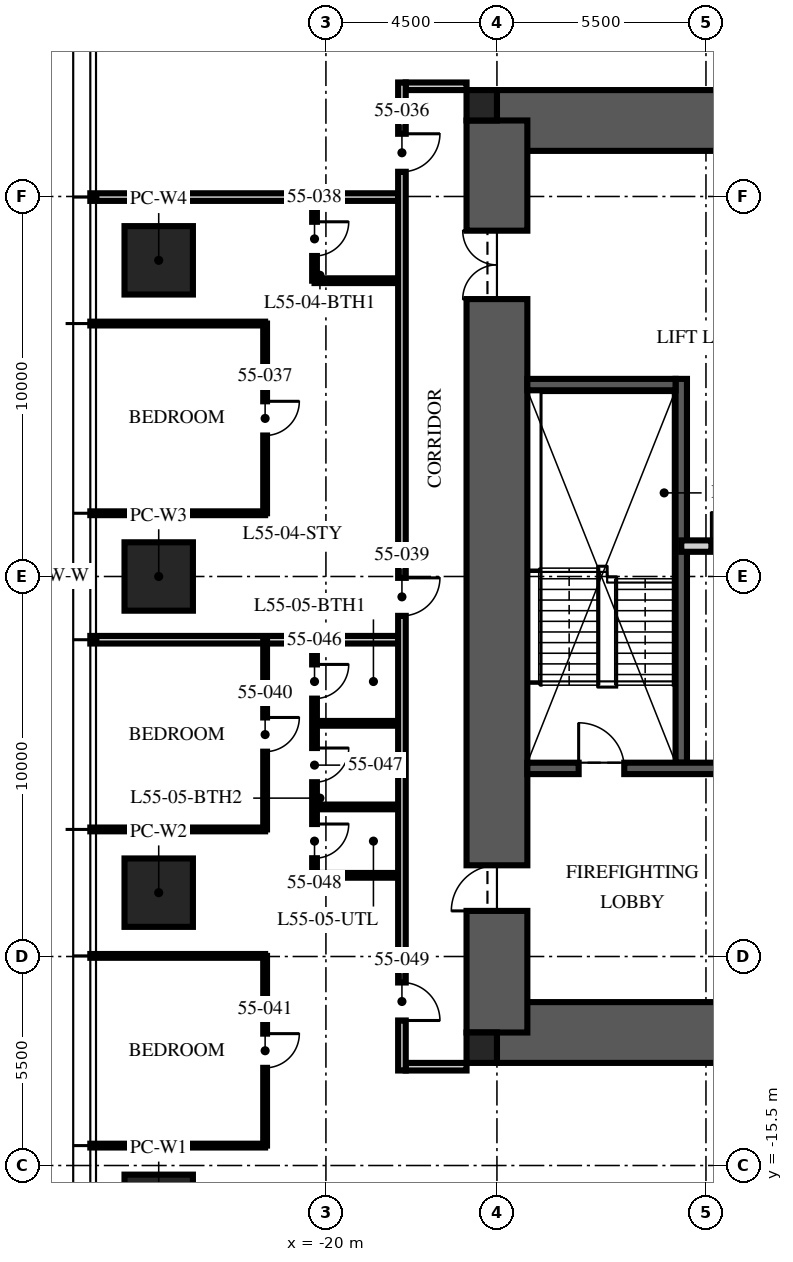
"""IFC4 building model, lengths in metres.
Left out: names, types, materials, properties, quantities, classifications, styles, units other than length and angle.
Written with IfcOpenShell. Run it as: python <this file> out.ifc"""

import sys

from ifc_helpers import new_model, si_unit, direction, frame, frame_2d, origin, origin_2d, place, context, subcontext, project, spatial, rectangle, extrude, element, fill, save


model = new_model("IFC4")
c1 = context("Model", 3, precision=1e-05, world=origin(), true_north=direction((0.0, 1.0)))
c2 = subcontext(c1, "Body", "Model", "MODEL_VIEW")
j1 = project(units=[si_unit("LENGTHUNIT", "METRE"), si_unit("PLANEANGLEUNIT", "RADIAN")], contexts=[c1])
p1 = place(None, origin())
s1 = spatial("IfcSite", under=j1, at=p1, CompositionType="ELEMENT")
p2 = place(p1, origin())
s2 = spatial("IfcBuilding", under=s1, at=p2, CompositionType="ELEMENT")
p3 = place(p2, frame((0.0, 0.0, 222.0)))
s3 = spatial("IfcBuildingStorey", under=s2, at=p3, CompositionType="ELEMENT", Elevation=222.0)
for number, where, z_axis, x_axis in (
    (1, (-15.5, 12.0, -0.25), (0.0, 0.0, 1.0), (1.0, 0.0, 0.0)),
    (2, (-15.5, -12.0, -0.25), (0.0, 0.0, 1.0), (1.0, 0.0, 0.0)),
):
    element("IfcWall", number, at=place(p3, frame(where, z_axis=z_axis, x_axis=x_axis)), inside=s3, PredefinedType="SHEAR", context=c2, shape_type="SweptSolid", body=[
        extrude(rectangle(XDim=31.0, YDim=1.6, at=frame_2d((15.5, 0.0))), origin(), (0.0, 0.0, 1.0), 3.75),
    ])
p4 = place(p3, frame((-15.5, -12.0, -0.25), z_axis=(0.0, 0.0, 1.0), x_axis=(0.0, 1.0, 0.0)))
e3 = element("IfcWall", 3, at=p4, inside=s3, PredefinedType="SHEAR", context=c2, shape_type="SweptSolid", body=[
    extrude(rectangle(XDim=24.0, YDim=1.6, at=frame_2d((12.0, 0.0))), origin(), (0.0, 0.0, 1.0), 3.75),
])
p5 = place(p4, frame((3.2, 0.0, 0.25)))
e4 = element("IfcOpeningElement", 4, at=p5, cuts=e3, PredefinedType="OPENING", context=c2, shape_type="SweptSolid", body=[
    extrude(rectangle(XDim=1.2, YDim=2.1, at=frame_2d((0.6, 1.05))), frame((0.0, 0.81, 0.0), z_axis=(0.0, -1.0, 0.0), x_axis=(1.0, 0.0, 0.0)), (0.0, 0.0, 1.0), 1.62),
])
p6 = place(p4, frame((19.3, 0.0, 0.25)))
e5 = element("IfcOpeningElement", 5, at=p6, cuts=e3, PredefinedType="OPENING", context=c2, shape_type="SweptSolid", body=[
    extrude(rectangle(XDim=1.8, YDim=2.1, at=frame_2d((0.9, 1.05))), frame((0.0, 0.81, 0.0), z_axis=(0.0, -1.0, 0.0), x_axis=(1.0, 0.0, 0.0)), (0.0, 0.0, 1.0), 1.62),
])
for number, where, z_axis, x_axis in (
    (6, (-15.9, 12.4, -0.25), (0.0, 0.0, 1.0), (1.0, 0.0, 0.0)),
    (7, (-15.9, -12.4, -0.25), (0.0, 0.0, 1.0), (1.0, 0.0, 0.0)),
):
    element("IfcColumn", number, at=place(p3, frame(where, z_axis=z_axis, x_axis=x_axis)), inside=s3, PredefinedType="COLUMN", context=c2, shape_type="SweptSolid", body=[
        extrude(rectangle(XDim=0.8, YDim=0.8, at=origin_2d()), origin(), (0.0, 0.0, 1.0), 3.75),
    ])
for number, where, z_axis, x_axis in (
    (8, (-24.4, -16.64, 0.0), (0.0, 0.0, 1.0), (0.0, 1.0, 0.0)),
    (9, (-24.4, -8.32, 0.0), (0.0, 0.0, 1.0), (0.0, 1.0, 0.0)),
    (10, (-24.4, 0.0, 0.0), (0.0, 0.0, 1.0), (0.0, 1.0, 0.0)),
    (11, (-24.4, 8.32, 0.0), (0.0, 0.0, 1.0), (0.0, 1.0, 0.0)),
):
    element("IfcColumn", number, at=place(p3, frame(where, z_axis=z_axis, x_axis=x_axis)), inside=s3, PredefinedType="COLUMN", context=c2, shape_type="SweptSolid", body=[
        extrude(rectangle(XDim=1.8, YDim=1.8, at=origin_2d()), origin(), (0.0, 0.0, 1.0), 3.75),
    ])
p7 = place(p3, frame((-10.65, -4.9, 0.0), z_axis=(0.0, 0.0, 1.0), x_axis=(0.0, 1.0, 0.0)))
e12 = element("IfcWall", 12, at=p7, inside=s3, PredefinedType="SOLIDWALL", context=c2, shape_type="SweptSolid", body=[
    extrude(rectangle(XDim=10.1, YDim=0.3, at=frame_2d((5.05, 0.0))), origin(), (0.0, 0.0, 1.0), 3.5),
])
p8 = place(p3, frame((-14.7, -5.05, 0.0), z_axis=(0.0, 0.0, 1.0), x_axis=(1.0, 0.0, 0.0)))
e13 = element("IfcWall", 13, at=p8, inside=s3, PredefinedType="SOLIDWALL", context=c2, shape_type="SweptSolid", body=[
    extrude(rectangle(XDim=5.9, YDim=0.3, at=frame_2d((2.95, 0.0))), origin(), (0.0, 0.0, 1.0), 3.5),
])
p9 = place(p8, frame((1.35, 0.0, 0.0)))
e14 = element("IfcOpeningElement", 14, at=p9, cuts=e13, PredefinedType="OPENING", context=c2, shape_type="SweptSolid", body=[
    extrude(rectangle(XDim=1.2, YDim=2.1, at=frame_2d((0.6, 1.05))), frame((0.0, 0.16, 0.0), z_axis=(0.0, -1.0, 0.0), x_axis=(1.0, 0.0, 0.0)), (0.0, 0.0, 1.0), 0.32),
])
p10 = place(p3, frame((-14.7, 5.05, 0.0), z_axis=(0.0, 0.0, 1.0), x_axis=(1.0, 0.0, 0.0)))
e15 = element("IfcWall", 15, at=p10, inside=s3, PredefinedType="SOLIDWALL", context=c2, shape_type="SweptSolid", body=[
    extrude(rectangle(XDim=3.9, YDim=0.3, at=frame_2d((1.95, 0.0))), origin(), (0.0, 0.0, 1.0), 3.5),
])
p11 = place(p3, frame((-10.65, 0.8, 0.0), z_axis=(0.0, 0.0, 1.0), x_axis=(1.0, 0.0, 0.0)))
e16 = element("IfcWall", 16, at=p11, inside=s3, PredefinedType="PARTITIONING", context=c2, shape_type="SweptSolid", body=[
    extrude(rectangle(XDim=21.3, YDim=0.3, at=frame_2d((10.65, 0.0))), origin(), (0.0, 0.0, 1.0), 3.5),
])
p12 = place(p11, frame((10.05, 0.0, 0.0)))
e17 = element("IfcOpeningElement", 17, at=p12, cuts=e16, PredefinedType="OPENING", context=c2, shape_type="SweptSolid", body=[
    extrude(rectangle(XDim=1.2, YDim=2.1, at=frame_2d((0.6, 1.05))), frame((0.0, 0.16, 0.0), z_axis=(0.0, -1.0, 0.0), x_axis=(1.0, 0.0, 0.0)), (0.0, 0.0, 1.0), 0.32),
])
p13 = place(p11, frame((0.793, 0.0, 0.0)))
e18 = element("IfcOpeningElement", 18, at=p13, cuts=e16, PredefinedType="OPENING", context=c2, shape_type="SweptSolid", body=[
    extrude(rectangle(XDim=0.9, YDim=2.1, at=frame_2d((0.45, 1.05))), frame((0.0, 0.16, 0.0), z_axis=(0.0, -1.0, 0.0), x_axis=(1.0, 0.0, 0.0)), (0.0, 0.0, 1.0), 0.32),
])
for number, where, z_axis, x_axis in (
    (19, (-16.3, 12.9, 0.0), (0.0, 0.0, 1.0), (-1.0, 0.0, 0.0)),
    (20, (-16.3, -12.9, 0.0), (0.0, 0.0, 1.0), (-1.0, 0.0, 0.0)),
):
    element("IfcWall", number, at=place(p3, frame(where, z_axis=z_axis, x_axis=x_axis)), inside=s3, PredefinedType="PARTITIONING", context=c2, shape_type="SweptSolid", body=[
        extrude(rectangle(XDim=1.6, YDim=0.2, at=frame_2d((0.8, 0.0))), origin(), (0.0, 0.0, 1.0), 2.3),
    ])
p14 = place(p3, frame((-18.1, 9.984, 0.0), z_axis=(0.0, 0.0, 1.0), x_axis=(-1.0, 0.0, 0.0)))
e21 = element("IfcWall", 21, at=p14, inside=s3, PredefinedType="PARTITIONING", context=c2, shape_type="SweptSolid", body=[
    extrude(rectangle(XDim=8.1, YDim=0.2, at=frame_2d((4.05, 0.0))), origin(), (0.0, 0.0, 1.0), 2.91),
])
for number, where, z_axis, x_axis in (
    (22, (-21.6, 6.656, 0.0), (0.0, 0.0, 1.0), (-1.0, 0.0, 0.0)),
    (23, (-21.6, 1.664, 0.0), (0.0, 0.0, 1.0), (-1.0, 0.0, 0.0)),
):
    element("IfcWall", number, at=place(p3, frame(where, z_axis=z_axis, x_axis=x_axis)), inside=s3, PredefinedType="PARTITIONING", context=c2, shape_type="SweptSolid", body=[
        extrude(rectangle(XDim=4.6, YDim=0.1, at=frame_2d((2.3, 0.0))), origin(), (0.0, 0.0, 1.0), 2.91),
    ])
p15 = place(p3, frame((-18.1, -1.664, 0.0), z_axis=(0.0, 0.0, 1.0), x_axis=(-1.0, 0.0, 0.0)))
e24 = element("IfcWall", 24, at=p15, inside=s3, PredefinedType="PARTITIONING", context=c2, shape_type="SweptSolid", body=[
    extrude(rectangle(XDim=8.1, YDim=0.2, at=frame_2d((4.05, 0.0))), origin(), (0.0, 0.0, 1.0), 2.91),
])
for number, where, z_axis, x_axis in (
    (25, (-21.6, -6.656, 0.0), (0.0, 0.0, 1.0), (-1.0, 0.0, 0.0)),
    (26, (-21.6, -9.984, 0.0), (0.0, 0.0, 1.0), (-1.0, 0.0, 0.0)),
    (27, (-21.6, -14.976, 0.0), (0.0, 0.0, 1.0), (-1.0, 0.0, 0.0)),
):
    element("IfcWall", number, at=place(p3, frame(where, z_axis=z_axis, x_axis=x_axis)), inside=s3, PredefinedType="PARTITIONING", context=c2, shape_type="SweptSolid", body=[
        extrude(rectangle(XDim=4.6, YDim=0.1, at=frame_2d((2.3, 0.0))), origin(), (0.0, 0.0, 1.0), 2.91),
    ])
p16 = place(p3, frame((-21.6, 6.656, 0.0), z_axis=(0.0, 0.0, 1.0), x_axis=(0.0, -1.0, 0.0)))
e28 = element("IfcWall", 28, at=p16, inside=s3, PredefinedType="PARTITIONING", context=c2, shape_type="SweptSolid", body=[
    extrude(rectangle(XDim=4.992, YDim=0.1, at=frame_2d((2.496, 0.0))), origin(), (0.0, 0.0, 1.0), 2.81),
])
p17 = place(p16, frame((2.046, 0.0, 0.0)))
e29 = element("IfcOpeningElement", 29, at=p17, cuts=e28, PredefinedType="OPENING", context=c2, shape_type="SweptSolid", body=[
    extrude(rectangle(XDim=0.9, YDim=2.1, at=frame_2d((0.45, 1.05))), frame((0.0, 0.06, 0.0), z_axis=(0.0, -1.0, 0.0), x_axis=(1.0, 0.0, 0.0)), (0.0, 0.0, 1.0), 0.12),
])
p18 = place(p3, frame((-20.3, 9.984, 0.0), z_axis=(0.0, 0.0, 1.0), x_axis=(0.0, -1.0, 0.0)))
e30 = element("IfcWall", 30, at=p18, inside=s3, PredefinedType="PARTITIONING", context=c2, shape_type="SweptSolid", body=[
    extrude(rectangle(XDim=2.2, YDim=0.125, at=frame_2d((1.1, 0.0))), origin(), (0.0, 0.0, 1.0), 2.6),
])
p19 = place(p18, frame((0.65, 0.0, 0.0)))
e31 = element("IfcOpeningElement", 31, at=p19, cuts=e30, PredefinedType="OPENING", context=c2, shape_type="SweptSolid", body=[
    extrude(rectangle(XDim=0.9, YDim=2.1, at=frame_2d((0.45, 1.05))), frame((0.0, 0.073, 0.0), z_axis=(0.0, -1.0, 0.0), x_axis=(1.0, 0.0, 0.0)), (0.0, 0.0, 1.0), 0.145),
])
p20 = place(p3, frame((-18.1, 7.784, 0.0), z_axis=(0.0, 0.0, 1.0), x_axis=(-1.0, 0.0, 0.0)))
e32 = element("IfcWall", 32, at=p20, inside=s3, PredefinedType="PARTITIONING", context=c2, shape_type="SweptSolid", body=[
    extrude(rectangle(XDim=2.2, YDim=0.125, at=frame_2d((1.1, 0.0))), origin(), (0.0, 0.0, 1.0), 3.5),
])
p21 = place(p3, frame((-21.6, -1.664, 0.0), z_axis=(0.0, 0.0, 1.0), x_axis=(0.0, -1.0, 0.0)))
e33 = element("IfcWall", 33, at=p21, inside=s3, PredefinedType="PARTITIONING", context=c2, shape_type="SweptSolid", body=[
    extrude(rectangle(XDim=4.992, YDim=0.1, at=frame_2d((2.496, 0.0))), origin(), (0.0, 0.0, 1.0), 2.81),
])
p22 = place(p21, frame((2.046, 0.0, 0.0)))
e34 = element("IfcOpeningElement", 34, at=p22, cuts=e33, PredefinedType="OPENING", context=c2, shape_type="SweptSolid", body=[
    extrude(rectangle(XDim=0.9, YDim=2.1, at=frame_2d((0.45, 1.05))), frame((0.0, 0.06, 0.0), z_axis=(0.0, -1.0, 0.0), x_axis=(1.0, 0.0, 0.0)), (0.0, 0.0, 1.0), 0.12),
])
p23 = place(p3, frame((-21.6, -9.984, 0.0), z_axis=(0.0, 0.0, 1.0), x_axis=(0.0, -1.0, 0.0)))
e35 = element("IfcWall", 35, at=p23, inside=s3, PredefinedType="PARTITIONING", context=c2, shape_type="SweptSolid", body=[
    extrude(rectangle(XDim=4.992, YDim=0.1, at=frame_2d((2.496, 0.0))), origin(), (0.0, 0.0, 1.0), 2.81),
])
p24 = place(p23, frame((2.046, 0.0, 0.0)))
e36 = element("IfcOpeningElement", 36, at=p24, cuts=e35, PredefinedType="OPENING", context=c2, shape_type="SweptSolid", body=[
    extrude(rectangle(XDim=0.9, YDim=2.1, at=frame_2d((0.45, 1.05))), frame((0.0, 0.06, 0.0), z_axis=(0.0, -1.0, 0.0), x_axis=(1.0, 0.0, 0.0)), (0.0, 0.0, 1.0), 0.12),
])
p25 = place(p3, frame((-20.3, -1.664, 0.0), z_axis=(0.0, 0.0, 1.0), x_axis=(0.0, -1.0, 0.0)))
e37 = element("IfcWall", 37, at=p25, inside=s3, PredefinedType="PARTITIONING", context=c2, shape_type="SweptSolid", body=[
    extrude(rectangle(XDim=6.2, YDim=0.125, at=frame_2d((3.1, 0.0))), origin(), (0.0, 0.0, 1.0), 2.81),
])
p26 = place(p25, frame((0.65, 0.0, 0.0)))
e38 = element("IfcOpeningElement", 38, at=p26, cuts=e37, PredefinedType="OPENING", context=c2, shape_type="SweptSolid", body=[
    extrude(rectangle(XDim=0.9, YDim=2.1, at=frame_2d((0.45, 1.05))), frame((0.0, 0.073, 0.0), z_axis=(0.0, -1.0, 0.0), x_axis=(1.0, 0.0, 0.0)), (0.0, 0.0, 1.0), 0.145),
])
p27 = place(p25, frame((2.85, 0.0, 0.0)))
e39 = element("IfcOpeningElement", 39, at=p27, cuts=e37, PredefinedType="OPENING", context=c2, shape_type="SweptSolid", body=[
    extrude(rectangle(XDim=0.9, YDim=2.1, at=frame_2d((0.45, 1.05))), frame((0.0, 0.073, 0.0), z_axis=(0.0, -1.0, 0.0), x_axis=(1.0, 0.0, 0.0)), (0.0, 0.0, 1.0), 0.145),
])
p28 = place(p25, frame((4.85, 0.0, 0.0)))
e40 = element("IfcOpeningElement", 40, at=p28, cuts=e37, PredefinedType="OPENING", context=c2, shape_type="SweptSolid", body=[
    extrude(rectangle(XDim=0.9, YDim=2.1, at=frame_2d((0.45, 1.05))), frame((0.0, 0.073, 0.0), z_axis=(0.0, -1.0, 0.0), x_axis=(1.0, 0.0, 0.0)), (0.0, 0.0, 1.0), 0.145),
])
for number, where, z_axis, x_axis in (
    (41, (-18.1, -3.864, 0.0), (0.0, 0.0, 1.0), (-1.0, 0.0, 0.0)),
    (42, (-18.1, -6.064, 0.0), (0.0, 0.0, 1.0), (-1.0, 0.0, 0.0)),
    (43, (-18.1, -7.864, 0.0), (0.0, 0.0, 1.0), (-1.0, 0.0, 0.0)),
):
    element("IfcWall", number, at=place(p3, frame(where, z_axis=z_axis, x_axis=x_axis)), inside=s3, PredefinedType="PARTITIONING", context=c2, shape_type="SweptSolid", body=[
        extrude(rectangle(XDim=2.2, YDim=0.125, at=frame_2d((1.1, 0.0))), origin(), (0.0, 0.0, 1.0), 3.5),
    ])
p29 = place(p3, frame((-18.0, 13.0, 0.0), z_axis=(0.0, 0.0, 1.0), x_axis=(0.0, -1.0, 0.0)))
e44 = element("IfcWall", 44, at=p29, inside=s3, PredefinedType="PARTITIONING", context=c2, shape_type="SweptSolid", body=[
    extrude(rectangle(XDim=26.0, YDim=0.2, at=frame_2d((13.0, 0.0))), origin(), (0.0, 0.0, 1.0), 2.6),
])
p30 = place(p29, frame((1.35, 0.0, 0.0)))
e45 = element("IfcOpeningElement", 45, at=p30, cuts=e44, PredefinedType="OPENING", context=c2, shape_type="SweptSolid", body=[
    extrude(rectangle(XDim=1.0, YDim=2.2, at=frame_2d((0.5, 1.1))), frame((0.0, 0.11, 0.0), z_axis=(0.0, -1.0, 0.0), x_axis=(1.0, 0.0, 0.0)), (0.0, 0.0, 1.0), 0.22),
])
p31 = place(p29, frame((13.036, 0.0, 0.0)))
e46 = element("IfcOpeningElement", 46, at=p31, cuts=e44, PredefinedType="OPENING", context=c2, shape_type="SweptSolid", body=[
    extrude(rectangle(XDim=1.0, YDim=2.2, at=frame_2d((0.5, 1.1))), frame((0.0, 0.11, 0.0), z_axis=(0.0, -1.0, 0.0), x_axis=(1.0, 0.0, 0.0)), (0.0, 0.0, 1.0), 0.22),
])
p32 = place(p29, frame((23.684, 0.0, 0.0)))
e47 = element("IfcOpeningElement", 47, at=p32, cuts=e44, PredefinedType="OPENING", context=c2, shape_type="SweptSolid", body=[
    extrude(rectangle(XDim=1.0, YDim=2.2, at=frame_2d((0.5, 1.1))), frame((0.0, 0.11, 0.0), z_axis=(0.0, -1.0, 0.0), x_axis=(1.0, 0.0, 0.0)), (0.0, 0.0, 1.0), 0.22),
])
p33 = place(p9, origin())
e48 = element("IfcDoor", 48, at=p33, inside=s3, OperationType="SINGLE_SWING_LEFT", PredefinedType="DOOR", context=c2, shape_type="SweptSolid", body=[
    extrude(rectangle(XDim=1.2, YDim=2.1, at=frame_2d((0.6, 1.05))), frame((0.0, 0.025, 0.0), z_axis=(0.0, -1.0, 0.0), x_axis=(1.0, 0.0, 0.0)), (0.0, 0.0, 1.0), 0.05),
])
fill(e14, e48)
p34 = place(p5, origin())
e49 = element("IfcDoor", 49, at=p34, inside=s3, OperationType="SINGLE_SWING_LEFT", PredefinedType="DOOR", context=c2, shape_type="SweptSolid", body=[
    extrude(rectangle(XDim=1.2, YDim=2.1, at=frame_2d((0.6, 1.05))), frame((0.0, 0.025, 0.0), z_axis=(0.0, -1.0, 0.0), x_axis=(1.0, 0.0, 0.0)), (0.0, 0.0, 1.0), 0.05),
])
fill(e4, e49)
p35 = place(p6, origin())
e50 = element("IfcDoor", 50, at=p35, inside=s3, OperationType="DOUBLE_DOOR_SINGLE_SWING", PredefinedType="DOOR", context=c2, shape_type="SweptSolid", body=[
    extrude(rectangle(XDim=1.8, YDim=2.1, at=frame_2d((0.9, 1.05))), frame((0.0, 0.025, 0.0), z_axis=(0.0, -1.0, 0.0), x_axis=(1.0, 0.0, 0.0)), (0.0, 0.0, 1.0), 0.05),
])
fill(e5, e50)
p36 = place(p13, origin())
e51 = element("IfcDoor", 51, at=p36, inside=s3, OperationType="SINGLE_SWING_LEFT", PredefinedType="DOOR", context=c2, shape_type="SweptSolid", body=[
    extrude(rectangle(XDim=0.9, YDim=2.1, at=frame_2d((0.45, 1.05))), frame((0.0, 0.025, 0.0), z_axis=(0.0, -1.0, 0.0), x_axis=(1.0, 0.0, 0.0)), (0.0, 0.0, 1.0), 0.05),
])
fill(e18, e51)
p37 = place(p30, origin())
e52 = element("IfcDoor", 52, at=p37, inside=s3, OperationType="SINGLE_SWING_LEFT", PredefinedType="DOOR", context=c2, shape_type="SweptSolid", body=[
    extrude(rectangle(XDim=1.0, YDim=2.2, at=frame_2d((0.5, 1.1))), frame((0.0, 0.025, 0.0), z_axis=(0.0, -1.0, 0.0), x_axis=(1.0, 0.0, 0.0)), (0.0, 0.0, 1.0), 0.05),
])
fill(e45, e52)
p38 = place(p17, origin())
e53 = element("IfcDoor", 53, at=p38, inside=s3, OperationType="SINGLE_SWING_LEFT", PredefinedType="DOOR", context=c2, shape_type="SweptSolid", body=[
    extrude(rectangle(XDim=0.9, YDim=2.1, at=frame_2d((0.45, 1.05))), frame((0.0, 0.025, 0.0), z_axis=(0.0, -1.0, 0.0), x_axis=(1.0, 0.0, 0.0)), (0.0, 0.0, 1.0), 0.05),
])
fill(e29, e53)
p39 = place(p19, origin())
e54 = element("IfcDoor", 54, at=p39, inside=s3, OperationType="SINGLE_SWING_LEFT", PredefinedType="DOOR", context=c2, shape_type="SweptSolid", body=[
    extrude(rectangle(XDim=0.9, YDim=2.1, at=frame_2d((0.45, 1.05))), frame((0.0, 0.025, 0.0), z_axis=(0.0, -1.0, 0.0), x_axis=(1.0, 0.0, 0.0)), (0.0, 0.0, 1.0), 0.05),
])
fill(e31, e54)
p40 = place(p31, origin())
e55 = element("IfcDoor", 55, at=p40, inside=s3, OperationType="SINGLE_SWING_LEFT", PredefinedType="DOOR", context=c2, shape_type="SweptSolid", body=[
    extrude(rectangle(XDim=1.0, YDim=2.2, at=frame_2d((0.5, 1.1))), frame((0.0, 0.025, 0.0), z_axis=(0.0, -1.0, 0.0), x_axis=(1.0, 0.0, 0.0)), (0.0, 0.0, 1.0), 0.05),
])
fill(e46, e55)
p41 = place(p22, origin())
e56 = element("IfcDoor", 56, at=p41, inside=s3, OperationType="SINGLE_SWING_LEFT", PredefinedType="DOOR", context=c2, shape_type="SweptSolid", body=[
    extrude(rectangle(XDim=0.9, YDim=2.1, at=frame_2d((0.45, 1.05))), frame((0.0, 0.025, 0.0), z_axis=(0.0, -1.0, 0.0), x_axis=(1.0, 0.0, 0.0)), (0.0, 0.0, 1.0), 0.05),
])
fill(e34, e56)
p42 = place(p24, origin())
e57 = element("IfcDoor", 57, at=p42, inside=s3, OperationType="SINGLE_SWING_LEFT", PredefinedType="DOOR", context=c2, shape_type="SweptSolid", body=[
    extrude(rectangle(XDim=0.9, YDim=2.1, at=frame_2d((0.45, 1.05))), frame((0.0, 0.025, 0.0), z_axis=(0.0, -1.0, 0.0), x_axis=(1.0, 0.0, 0.0)), (0.0, 0.0, 1.0), 0.05),
])
fill(e36, e57)
p43 = place(p26, origin())
e58 = element("IfcDoor", 58, at=p43, inside=s3, OperationType="SINGLE_SWING_LEFT", PredefinedType="DOOR", context=c2, shape_type="SweptSolid", body=[
    extrude(rectangle(XDim=0.9, YDim=2.1, at=frame_2d((0.45, 1.05))), frame((0.0, 0.025, 0.0), z_axis=(0.0, -1.0, 0.0), x_axis=(1.0, 0.0, 0.0)), (0.0, 0.0, 1.0), 0.05),
])
fill(e38, e58)
p44 = place(p27, origin())
e59 = element("IfcDoor", 59, at=p44, inside=s3, OperationType="SINGLE_SWING_LEFT", PredefinedType="DOOR", context=c2, shape_type="SweptSolid", body=[
    extrude(rectangle(XDim=0.9, YDim=2.1, at=frame_2d((0.45, 1.05))), frame((0.0, 0.025, 0.0), z_axis=(0.0, -1.0, 0.0), x_axis=(1.0, 0.0, 0.0)), (0.0, 0.0, 1.0), 0.05),
])
fill(e39, e59)
p45 = place(p28, origin())
e60 = element("IfcDoor", 60, at=p45, inside=s3, OperationType="SINGLE_SWING_LEFT", PredefinedType="DOOR", context=c2, shape_type="SweptSolid", body=[
    extrude(rectangle(XDim=0.9, YDim=2.1, at=frame_2d((0.45, 1.05))), frame((0.0, 0.025, 0.0), z_axis=(0.0, -1.0, 0.0), x_axis=(1.0, 0.0, 0.0)), (0.0, 0.0, 1.0), 0.05),
])
fill(e40, e60)
p46 = place(p32, origin())
e61 = element("IfcDoor", 61, at=p46, inside=s3, OperationType="SINGLE_SWING_RIGHT", PredefinedType="DOOR", context=c2, shape_type="SweptSolid", body=[
    extrude(rectangle(XDim=1.0, YDim=2.2, at=frame_2d((0.5, 1.1))), frame((0.0, 0.025, 0.0), z_axis=(0.0, -1.0, 0.0), x_axis=(1.0, 0.0, 0.0)), (0.0, 0.0, 1.0), 0.05),
])
fill(e47, e61)
save(model, sys.argv[1])
